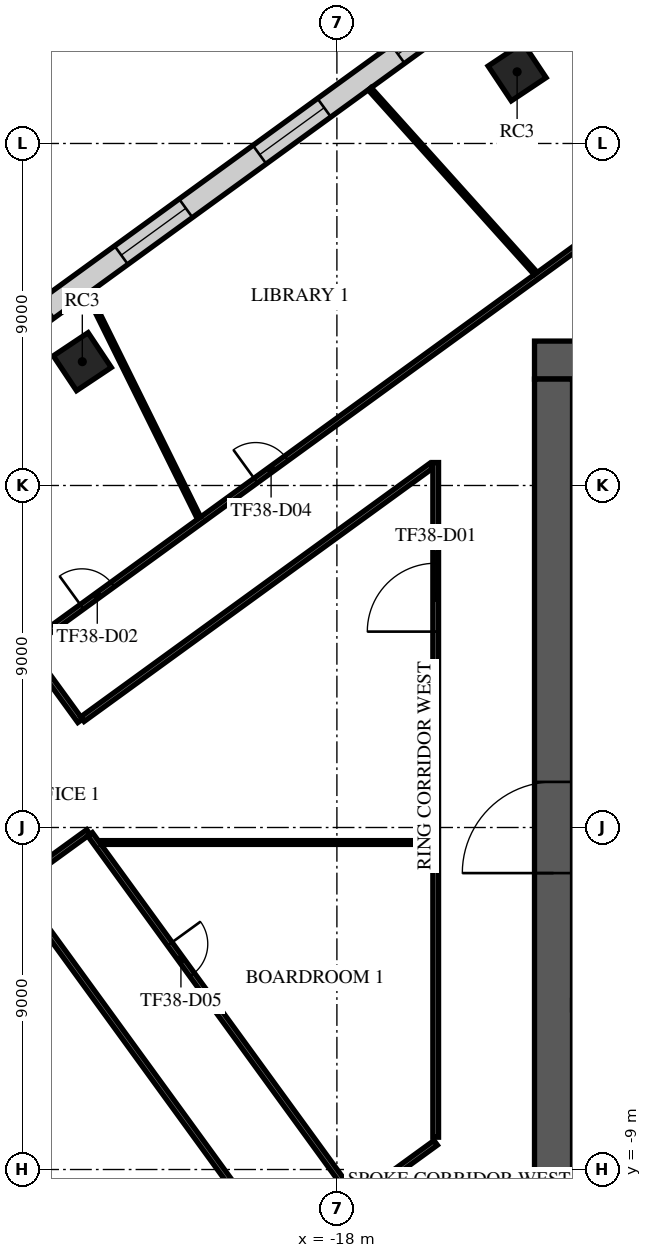
"""IFC4 building model, lengths in metres.
Left out: names, types, materials, properties, quantities, classifications, styles, units other than length and angle.
Written with IfcOpenShell. Run it as: python <this file> out.ifc"""

import sys

from ifc_helpers import new_model, si_unit, direction, frame, frame_2d, origin, origin_2d, place, context, subcontext, project, spatial, rectangle, extrude, element, fill, save


model = new_model("IFC4")
c1 = context("Model", 3, precision=1e-05, world=origin(), true_north=direction((0.0, 1.0)))
c2 = subcontext(c1, "Body", "Model", "MODEL_VIEW")
j1 = project(units=[si_unit("LENGTHUNIT", "METRE"), si_unit("PLANEANGLEUNIT", "RADIAN")], contexts=[c1])
p1 = place(None, origin())
s1 = spatial("IfcSite", under=j1, at=p1, CompositionType="ELEMENT")
p2 = place(p1, origin())
s2 = spatial("IfcBuilding", under=s1, at=p2, CompositionType="ELEMENT")
p3 = place(p2, frame((0.0, 0.0, 163.7)))
s3 = spatial("IfcBuildingStorey", under=s2, at=p3, CompositionType="ELEMENT", Elevation=163.7)
for number, where, z_axis, x_axis in (
    (1, (-13.258, 19.885, 0.0), (0.0, 0.0, 1.0), (0.832, 0.555, 0.0)),
    (2, (-24.699, 12.258, 0.0), (0.0, 0.0, 1.0), (0.832, 0.555, 0.0)),
):
    element("IfcColumn", number, at=place(p3, frame(where, z_axis=z_axis, x_axis=x_axis)), inside=s3, PredefinedType="COLUMN", context=c2, shape_type="SweptSolid", body=[
        extrude(rectangle(XDim=1.1, YDim=1.1, at=origin_2d()), origin(), (0.0, 0.0, 1.0), 4.0),
    ])
p4 = place(p3, frame((-12.8, 12.3, 0.0), z_axis=(0.0, 0.0, 1.0), x_axis=(1.0, 0.0, 0.0)))
e3 = element("IfcWall", 3, at=p4, inside=s3, PredefinedType="SHEAR", context=c2, shape_type="SweptSolid", body=[
    extrude(rectangle(XDim=25.6, YDim=1.0, at=frame_2d((12.8, 0.0))), origin(), (0.0, 0.0, 1.0), 3.6),
])
p5 = place(p4, frame((11.6, 0.0, 0.0)))
e4 = element("IfcOpeningElement", 4, at=p5, cuts=e3, PredefinedType="OPENING", context=c2, shape_type="SweptSolid", body=[
    extrude(rectangle(XDim=2.4, YDim=2.4, at=frame_2d((1.2, 1.2))), frame((0.0, 0.51, 0.0), z_axis=(0.0, -1.0, 0.0), x_axis=(1.0, 0.0, 0.0)), (0.0, 0.0, 1.0), 1.02),
])
p6 = place(p4, frame((22.425, 0.0, 0.0)))
e5 = element("IfcOpeningElement", 5, at=p6, cuts=e3, PredefinedType="OPENING", context=c2, shape_type="SweptSolid", body=[
    extrude(rectangle(XDim=1.2, YDim=2.1, at=frame_2d((0.6, 1.05))), frame((0.0, 0.51, 0.0), z_axis=(0.0, -1.0, 0.0), x_axis=(1.0, 0.0, 0.0)), (0.0, 0.0, 1.0), 1.02),
])
p7 = place(p4, frame((1.4, 0.0, 0.0)))
e6 = element("IfcOpeningElement", 6, at=p7, cuts=e3, PredefinedType="OPENING", context=c2, shape_type="SweptSolid", body=[
    extrude(rectangle(XDim=1.0, YDim=2.1, at=frame_2d((0.5, 1.05))), frame((0.0, 0.51, 0.0), z_axis=(0.0, -1.0, 0.0), x_axis=(1.0, 0.0, 0.0)), (0.0, 0.0, 1.0), 1.02),
])
p8 = place(p3, frame((-12.3, -11.8, 0.0), z_axis=(0.0, 0.0, 1.0), x_axis=(0.0, 1.0, 0.0)))
e7 = element("IfcWall", 7, at=p8, inside=s3, PredefinedType="SHEAR", context=c2, shape_type="SweptSolid", body=[
    extrude(rectangle(XDim=23.6, YDim=1.0, at=frame_2d((11.8, 0.0))), origin(), (0.0, 0.0, 1.0), 3.6),
])
p9 = place(p8, frame((10.6, 0.0, 0.0)))
e8 = element("IfcOpeningElement", 8, at=p9, cuts=e7, PredefinedType="OPENING", context=c2, shape_type="SweptSolid", body=[
    extrude(rectangle(XDim=2.4, YDim=2.4, at=frame_2d((1.2, 1.2))), frame((0.0, 0.51, 0.0), z_axis=(0.0, -1.0, 0.0), x_axis=(1.0, 0.0, 0.0)), (0.0, 0.0, 1.0), 1.02),
])
p10 = place(p3, frame((-8.65, -4.675, 0.0), z_axis=(0.0, 0.0, 1.0), x_axis=(-1.0, 0.0, 0.0)))
e9 = element("IfcWall", 9, at=p10, inside=s3, PredefinedType="SOLIDWALL", context=c2, shape_type="SweptSolid", body=[
    extrude(rectangle(XDim=3.15, YDim=0.25, at=frame_2d((1.575, 0.0))), origin(), (0.0, 0.0, 1.0), 3.6),
])
p11 = place(p3, frame((4.48, 35.516, 0.0), z_axis=(0.0, 0.0, 1.0), x_axis=(-0.809018017995, -0.587783843398, 0.0)))
e10 = element("IfcWall", 10, at=p11, inside=s3, PredefinedType="STANDARD", context=c2, shape_type="SweptSolid", body=[
    extrude(rectangle(XDim=49.376, YDim=0.6, at=frame_2d((24.688, 0.0))), origin(), (0.0, 0.0, 1.0), 3.6),
])
p12 = place(p11, frame((1.2, 0.0, 0.9)))
e11 = element("IfcOpeningElement", 11, at=p12, cuts=e10, PredefinedType="OPENING", context=c2, shape_type="SweptSolid", body=[
    extrude(rectangle(XDim=2.1, YDim=2.1, at=frame_2d((1.05, 1.05))), frame((0.0, 0.31, 0.0), z_axis=(0.0, -1.0, 0.0), x_axis=(1.0, 0.0, 0.0)), (0.0, 0.0, 1.0), 0.62),
])
p13 = place(p11, frame((5.7, 0.0, 0.9)))
e12 = element("IfcOpeningElement", 12, at=p13, cuts=e10, PredefinedType="OPENING", context=c2, shape_type="SweptSolid", body=[
    extrude(rectangle(XDim=2.1, YDim=2.1, at=frame_2d((1.05, 1.05))), frame((0.0, 0.31, 0.0), z_axis=(0.0, -1.0, 0.0), x_axis=(1.0, 0.0, 0.0)), (0.0, 0.0, 1.0), 0.62),
])
p14 = place(p11, frame((10.2, 0.0, 0.9)))
e13 = element("IfcOpeningElement", 13, at=p14, cuts=e10, PredefinedType="OPENING", context=c2, shape_type="SweptSolid", body=[
    extrude(rectangle(XDim=2.1, YDim=2.1, at=frame_2d((1.05, 1.05))), frame((0.0, 0.31, 0.0), z_axis=(0.0, -1.0, 0.0), x_axis=(1.0, 0.0, 0.0)), (0.0, 0.0, 1.0), 0.62),
])
p15 = place(p11, frame((14.7, 0.0, 0.9)))
e14 = element("IfcOpeningElement", 14, at=p15, cuts=e10, PredefinedType="OPENING", context=c2, shape_type="SweptSolid", body=[
    extrude(rectangle(XDim=2.1, YDim=2.1, at=frame_2d((1.05, 1.05))), frame((0.0, 0.31, 0.0), z_axis=(0.0, -1.0, 0.0), x_axis=(1.0, 0.0, 0.0)), (0.0, 0.0, 1.0), 0.62),
])
p16 = place(p11, frame((19.2, 0.0, 0.9)))
e15 = element("IfcOpeningElement", 15, at=p16, cuts=e10, PredefinedType="OPENING", context=c2, shape_type="SweptSolid", body=[
    extrude(rectangle(XDim=2.1, YDim=2.1, at=frame_2d((1.05, 1.05))), frame((0.0, 0.31, 0.0), z_axis=(0.0, -1.0, 0.0), x_axis=(1.0, 0.0, 0.0)), (0.0, 0.0, 1.0), 0.62),
])
p17 = place(p11, frame((23.7, 0.0, 0.9)))
e16 = element("IfcOpeningElement", 16, at=p17, cuts=e10, PredefinedType="OPENING", context=c2, shape_type="SweptSolid", body=[
    extrude(rectangle(XDim=2.1, YDim=2.1, at=frame_2d((1.05, 1.05))), frame((0.0, 0.31, 0.0), z_axis=(0.0, -1.0, 0.0), x_axis=(1.0, 0.0, 0.0)), (0.0, 0.0, 1.0), 0.62),
])
p18 = place(p11, frame((28.2, 0.0, 0.9)))
e17 = element("IfcOpeningElement", 17, at=p18, cuts=e10, PredefinedType="OPENING", context=c2, shape_type="SweptSolid", body=[
    extrude(rectangle(XDim=2.1, YDim=2.1, at=frame_2d((1.05, 1.05))), frame((0.0, 0.31, 0.0), z_axis=(0.0, -1.0, 0.0), x_axis=(1.0, 0.0, 0.0)), (0.0, 0.0, 1.0), 0.62),
])
p19 = place(p11, frame((32.7, 0.0, 0.9)))
e18 = element("IfcOpeningElement", 18, at=p19, cuts=e10, PredefinedType="OPENING", context=c2, shape_type="SweptSolid", body=[
    extrude(rectangle(XDim=2.1, YDim=2.1, at=frame_2d((1.05, 1.05))), frame((0.0, 0.31, 0.0), z_axis=(0.0, -1.0, 0.0), x_axis=(1.0, 0.0, 0.0)), (0.0, 0.0, 1.0), 0.62),
])
p20 = place(p11, frame((37.2, 0.0, 0.9)))
e19 = element("IfcOpeningElement", 19, at=p20, cuts=e10, PredefinedType="OPENING", context=c2, shape_type="SweptSolid", body=[
    extrude(rectangle(XDim=2.1, YDim=2.1, at=frame_2d((1.05, 1.05))), frame((0.0, 0.31, 0.0), z_axis=(0.0, -1.0, 0.0), x_axis=(1.0, 0.0, 0.0)), (0.0, 0.0, 1.0), 0.62),
])
p21 = place(p11, frame((41.7, 0.0, 0.9)))
e20 = element("IfcOpeningElement", 20, at=p21, cuts=e10, PredefinedType="OPENING", context=c2, shape_type="SweptSolid", body=[
    extrude(rectangle(XDim=2.1, YDim=2.1, at=frame_2d((1.05, 1.05))), frame((0.0, 0.31, 0.0), z_axis=(0.0, -1.0, 0.0), x_axis=(1.0, 0.0, 0.0)), (0.0, 0.0, 1.0), 0.62),
])
p22 = place(p11, frame((46.138, 0.0, 0.9)))
e21 = element("IfcOpeningElement", 21, at=p22, cuts=e10, PredefinedType="OPENING", context=c2, shape_type="SweptSolid", body=[
    extrude(rectangle(XDim=2.1, YDim=2.1, at=frame_2d((1.05, 1.05))), frame((0.0, 0.31, 0.0), z_axis=(0.0, -1.0, 0.0), x_axis=(1.0, 0.0, 0.0)), (0.0, 0.0, 1.0), 0.62),
])
p23 = place(p3, frame((-36.533, -0.245, 0.0), z_axis=(0.0, 0.0, 1.0), x_axis=(0.587787495615, -0.809015364501, 0.0)))
e22 = element("IfcWall", 22, at=p23, inside=s3, PredefinedType="STANDARD", context=c2, shape_type="SweptSolid", body=[
    extrude(rectangle(XDim=42.552, YDim=0.6, at=frame_2d((21.276, 0.0))), origin(), (0.0, 0.0, 1.0), 3.6),
])
p24 = place(p23, frame((1.178, 0.0, 0.9)))
e23 = element("IfcOpeningElement", 23, at=p24, cuts=e22, PredefinedType="OPENING", context=c2, shape_type="SweptSolid", body=[
    extrude(rectangle(XDim=1.8, YDim=2.1, at=frame_2d((0.9, 1.05))), frame((0.0, 0.31, 0.0), z_axis=(0.0, -1.0, 0.0), x_axis=(1.0, 0.0, 0.0)), (0.0, 0.0, 1.0), 0.62),
])
p25 = place(p23, frame((5.396, 0.0, 0.9)))
e24 = element("IfcOpeningElement", 24, at=p25, cuts=e22, PredefinedType="OPENING", context=c2, shape_type="SweptSolid", body=[
    extrude(rectangle(XDim=1.8, YDim=2.1, at=frame_2d((0.9, 1.05))), frame((0.0, 0.31, 0.0), z_axis=(0.0, -1.0, 0.0), x_axis=(1.0, 0.0, 0.0)), (0.0, 0.0, 1.0), 0.62),
])
p26 = place(p23, frame((9.676, 0.0, 0.9)))
e25 = element("IfcOpeningElement", 25, at=p26, cuts=e22, PredefinedType="OPENING", context=c2, shape_type="SweptSolid", body=[
    extrude(rectangle(XDim=1.8, YDim=2.1, at=frame_2d((0.9, 1.05))), frame((0.0, 0.31, 0.0), z_axis=(0.0, -1.0, 0.0), x_axis=(1.0, 0.0, 0.0)), (0.0, 0.0, 1.0), 0.62),
])
p27 = place(p23, frame((13.956, 0.0, 0.9)))
e26 = element("IfcOpeningElement", 26, at=p27, cuts=e22, PredefinedType="OPENING", context=c2, shape_type="SweptSolid", body=[
    extrude(rectangle(XDim=1.8, YDim=2.1, at=frame_2d((0.9, 1.05))), frame((0.0, 0.31, 0.0), z_axis=(0.0, -1.0, 0.0), x_axis=(1.0, 0.0, 0.0)), (0.0, 0.0, 1.0), 0.62),
])
p28 = place(p23, frame((18.236, 0.0, 0.9)))
e27 = element("IfcOpeningElement", 27, at=p28, cuts=e22, PredefinedType="OPENING", context=c2, shape_type="SweptSolid", body=[
    extrude(rectangle(XDim=1.8, YDim=2.1, at=frame_2d((0.9, 1.05))), frame((0.0, 0.31, 0.0), z_axis=(0.0, -1.0, 0.0), x_axis=(1.0, 0.0, 0.0)), (0.0, 0.0, 1.0), 0.62),
])
p29 = place(p23, frame((22.516, 0.0, 0.9)))
e28 = element("IfcOpeningElement", 28, at=p29, cuts=e22, PredefinedType="OPENING", context=c2, shape_type="SweptSolid", body=[
    extrude(rectangle(XDim=1.8, YDim=2.1, at=frame_2d((0.9, 1.05))), frame((0.0, 0.31, 0.0), z_axis=(0.0, -1.0, 0.0), x_axis=(1.0, 0.0, 0.0)), (0.0, 0.0, 1.0), 0.62),
])
p30 = place(p23, frame((26.796, 0.0, 0.9)))
e29 = element("IfcOpeningElement", 29, at=p30, cuts=e22, PredefinedType="OPENING", context=c2, shape_type="SweptSolid", body=[
    extrude(rectangle(XDim=1.8, YDim=2.1, at=frame_2d((0.9, 1.05))), frame((0.0, 0.31, 0.0), z_axis=(0.0, -1.0, 0.0), x_axis=(1.0, 0.0, 0.0)), (0.0, 0.0, 1.0), 0.62),
])
p31 = place(p23, frame((31.076, 0.0, 0.9)))
e30 = element("IfcOpeningElement", 30, at=p31, cuts=e22, PredefinedType="OPENING", context=c2, shape_type="SweptSolid", body=[
    extrude(rectangle(XDim=1.8, YDim=2.1, at=frame_2d((0.9, 1.05))), frame((0.0, 0.31, 0.0), z_axis=(0.0, -1.0, 0.0), x_axis=(1.0, 0.0, 0.0)), (0.0, 0.0, 1.0), 0.62),
])
p32 = place(p23, frame((35.356, 0.0, 0.9)))
e31 = element("IfcOpeningElement", 31, at=p32, cuts=e22, PredefinedType="OPENING", context=c2, shape_type="SweptSolid", body=[
    extrude(rectangle(XDim=1.8, YDim=2.1, at=frame_2d((0.9, 1.05))), frame((0.0, 0.31, 0.0), z_axis=(0.0, -1.0, 0.0), x_axis=(1.0, 0.0, 0.0)), (0.0, 0.0, 1.0), 0.62),
])
p33 = place(p23, frame((39.573, 0.0, 0.9)))
e32 = element("IfcOpeningElement", 32, at=p33, cuts=e22, PredefinedType="OPENING", context=c2, shape_type="SweptSolid", body=[
    extrude(rectangle(XDim=1.8, YDim=2.1, at=frame_2d((0.9, 1.05))), frame((0.0, 0.31, 0.0), z_axis=(0.0, -1.0, 0.0), x_axis=(1.0, 0.0, 0.0)), (0.0, 0.0, 1.0), 0.62),
])
p34 = place(p3, frame((-26.481, -1.528, 0.0), z_axis=(0.0, 0.0, 1.0), x_axis=(0.809158191643, 0.587590861822, 0.0)))
e33 = element("IfcWall", 33, at=p34, inside=s3, PredefinedType="PARTITIONING", context=c2, shape_type="SweptSolid", body=[
    extrude(rectangle(XDim=2.4, YDim=0.15, at=frame_2d((1.2, 0.0))), origin(), (0.0, 0.0, 1.0), 3.15),
])
p35 = place(p3, frame((-26.437, -1.589, 0.0), z_axis=(0.0, 0.0, 1.0), x_axis=(0.587768879666, -0.809028889531, 0.0)))
e34 = element("IfcWall", 34, at=p35, inside=s3, PredefinedType="PARTITIONING", context=c2, shape_type="SweptSolid", body=[
    extrude(rectangle(XDim=28.583, YDim=0.15, at=frame_2d((14.292, 0.0))), origin(), (0.0, 0.0, 1.0), 3.15),
])
p36 = place(p35, frame((16.711, 0.0, 0.0)))
e35 = element("IfcOpeningElement", 35, at=p36, cuts=e34, PredefinedType="OPENING", context=c2, shape_type="SweptSolid", body=[
    extrude(rectangle(XDim=1.0, YDim=2.1, at=frame_2d((0.5, 1.05))), frame((0.0, 0.085, 0.0), z_axis=(0.0, -1.0, 0.0), x_axis=(1.0, 0.0, 0.0)), (0.0, 0.0, 1.0), 0.17),
])
p37 = place(p3, frame((-26.166, 4.749, 0.0), z_axis=(0.0, 0.0, 1.0), x_axis=(0.809023795939, 0.587775890628, 0.0)))
e36 = element("IfcWall", 36, at=p37, inside=s3, PredefinedType="PARTITIONING", context=c2, shape_type="SweptSolid", body=[
    extrude(rectangle(XDim=36.756, YDim=0.15, at=frame_2d((18.378, 0.0))), origin(), (0.0, 0.0, 1.0), 3.15),
])
p38 = place(p37, frame((1.8, 0.0, 0.0)))
e37 = element("IfcOpeningElement", 37, at=p38, cuts=e36, PredefinedType="OPENING", context=c2, shape_type="SweptSolid", body=[
    extrude(rectangle(XDim=1.0, YDim=2.1, at=frame_2d((0.5, 1.05))), frame((0.0, 0.085, 0.0), z_axis=(0.0, -1.0, 0.0), x_axis=(1.0, 0.0, 0.0)), (0.0, 0.0, 1.0), 0.17),
])
p39 = place(p37, frame((7.453, 0.0, 0.0)))
e38 = element("IfcOpeningElement", 38, at=p39, cuts=e36, PredefinedType="OPENING", context=c2, shape_type="SweptSolid", body=[
    extrude(rectangle(XDim=1.0, YDim=2.1, at=frame_2d((0.5, 1.05))), frame((0.0, 0.085, 0.0), z_axis=(0.0, -1.0, 0.0), x_axis=(1.0, 0.0, 0.0)), (0.0, 0.0, 1.0), 0.17),
])
p40 = place(p37, frame((20.671, 0.0, 0.0)))
e39 = element("IfcOpeningElement", 39, at=p40, cuts=e36, PredefinedType="OPENING", context=c2, shape_type="SweptSolid", body=[
    extrude(rectangle(XDim=1.0, YDim=2.1, at=frame_2d((0.5, 1.05))), frame((0.0, 0.085, 0.0), z_axis=(0.0, -1.0, 0.0), x_axis=(1.0, 0.0, 0.0)), (0.0, 0.0, 1.0), 0.17),
])
p41 = place(p37, frame((27.382, 0.0, 0.0)))
e40 = element("IfcOpeningElement", 40, at=p41, cuts=e36, PredefinedType="OPENING", context=c2, shape_type="SweptSolid", body=[
    extrude(rectangle(XDim=1.8, YDim=2.1, at=frame_2d((0.9, 1.05))), frame((0.0, 0.085, 0.0), z_axis=(0.0, -1.0, 0.0), x_axis=(1.0, 0.0, 0.0)), (0.0, 0.0, 1.0), 0.17),
])
p42 = place(p3, frame((-26.122, 4.688, 0.0), z_axis=(0.0, 0.0, 1.0), x_axis=(0.5874596315, -0.809253471638, 0.0)))
e41 = element("IfcWall", 41, at=p42, inside=s3, PredefinedType="PARTITIONING", context=c2, shape_type="SweptSolid", body=[
    extrude(rectangle(XDim=2.325, YDim=0.15, at=frame_2d((1.162, 0.0))), origin(), (0.0, 0.0, 1.0), 3.15),
])
p43 = place(p3, frame((-24.695, 2.851, 0.0), z_axis=(0.0, 0.0, 1.0), x_axis=(0.809035699289, 0.587759506326, 0.0)))
e42 = element("IfcWall", 42, at=p43, inside=s3, PredefinedType="PARTITIONING", context=c2, shape_type="SweptSolid", body=[
    extrude(rectangle(XDim=11.342, YDim=0.15, at=frame_2d((5.671, 0.0))), origin(), (0.0, 0.0, 1.0), 3.15),
])
p44 = place(p3, frame((-24.495, -0.179, 0.0), z_axis=(0.0, 0.0, 1.0), x_axis=(0.587806096184, -0.809001849991, 0.0)))
e43 = element("IfcWall", 43, at=p44, inside=s3, PredefinedType="PARTITIONING", context=c2, shape_type="SweptSolid", body=[
    extrude(rectangle(XDim=11.914, YDim=0.15, at=frame_2d((5.957, 0.0))), origin(), (0.0, 0.0, 1.0), 3.15),
])
p45 = place(p44, frame((3.568, 0.0, 0.0)))
e44 = element("IfcOpeningElement", 44, at=p45, cuts=e43, PredefinedType="OPENING", context=c2, shape_type="SweptSolid", body=[
    extrude(rectangle(XDim=1.0, YDim=2.1, at=frame_2d((0.5, 1.05))), frame((0.0, 0.085, 0.0), z_axis=(0.0, -1.0, 0.0), x_axis=(1.0, 0.0, 0.0)), (0.0, 0.0, 1.0), 0.17),
])
p46 = place(p3, frame((-17.431, -9.773, 0.0), z_axis=(0.0, 0.0, 1.0), x_axis=(0.809042902641, 0.587749590971, 0.0)))
e45 = element("IfcWall", 45, at=p46, inside=s3, PredefinedType="PARTITIONING", context=c2, shape_type="SweptSolid", body=[
    extrude(rectangle(XDim=2.511, YDim=0.15, at=frame_2d((1.255, 0.0))), origin(), (0.0, 0.0, 1.0), 3.15),
])
p47 = place(p3, frame((-15.4, -8.15, 0.0), z_axis=(0.0, 0.0, 1.0), x_axis=(0.0, 1.0, 0.0)))
e46 = element("IfcWall", 46, at=p47, inside=s3, PredefinedType="PARTITIONING", context=c2, shape_type="SweptSolid", body=[
    extrude(rectangle(XDim=17.754, YDim=0.15, at=frame_2d((8.877, 0.0))), origin(), (0.0, 0.0, 1.0), 3.15),
])
p48 = place(p47, frame((13.304, 0.0, 0.0)))
e47 = element("IfcOpeningElement", 47, at=p48, cuts=e46, PredefinedType="OPENING", context=c2, shape_type="SweptSolid", body=[
    extrude(rectangle(XDim=1.8, YDim=2.1, at=frame_2d((0.9, 1.05))), frame((0.0, 0.085, 0.0), z_axis=(0.0, -1.0, 0.0), x_axis=(1.0, 0.0, 0.0)), (0.0, 0.0, 1.0), 0.17),
])
p49 = place(p3, frame((-24.549, 14.052, 0.0), z_axis=(0.0, 0.0, 1.0), x_axis=(0.443265486379, -0.896390377339, 0.0)))
e48 = element("IfcWall", 48, at=p49, inside=s3, PredefinedType="PARTITIONING", context=c2, shape_type="SweptSolid", body=[
    extrude(rectangle(XDim=6.587, YDim=0.1, at=frame_2d((3.293, 0.0))), origin(), (0.0, 0.0, 1.0), 2.9),
])
p50 = place(p3, frame((-24.209, -0.395, 0.0), z_axis=(0.0, 0.0, 1.0), x_axis=(1.0, 0.0, 0.0)))
e49 = element("IfcWall", 49, at=p50, inside=s3, PredefinedType="PARTITIONING", context=c2, shape_type="SweptSolid", body=[
    extrude(rectangle(XDim=8.734, YDim=0.1, at=frame_2d((4.367, 0.0))), origin(), (0.0, 0.0, 1.0), 3.15),
])
p51 = place(p3, frame((-17.136, 19.438, 0.0), z_axis=(0.0, 0.0, 1.0), x_axis=(0.66853916977, -0.743676931526, 0.0)))
e50 = element("IfcWall", 50, at=p51, inside=s3, PredefinedType="PARTITIONING", context=c2, shape_type="SweptSolid", body=[
    extrude(rectangle(XDim=6.531, YDim=0.1, at=frame_2d((3.266, 0.0))), origin(), (0.0, 0.0, 1.0), 2.9),
])
p52 = place(p9, origin())
e51 = element("IfcDoor", 51, at=p52, inside=s3, OperationType="SINGLE_SWING_LEFT", PredefinedType="DOOR", context=c2, shape_type="SweptSolid", body=[
    extrude(rectangle(XDim=2.4, YDim=2.4, at=frame_2d((1.2, 1.2))), frame((0.0, 0.025, 0.0), z_axis=(0.0, -1.0, 0.0), x_axis=(1.0, 0.0, 0.0)), (0.0, 0.0, 1.0), 0.05),
])
fill(e8, e51)
p53 = place(p17, origin())
e52 = element("IfcWindow", 52, at=p53, inside=s3, PartitioningType="SINGLE_PANEL", PredefinedType="WINDOW", context=c2, shape_type="SweptSolid", body=[
    extrude(rectangle(XDim=2.1, YDim=2.1, at=frame_2d((1.05, 1.05))), frame((0.0, 0.03, 0.0), z_axis=(0.0, -1.0, 0.0), x_axis=(1.0, 0.0, 0.0)), (0.0, 0.0, 1.0), 0.06),
])
fill(e16, e52)
p54 = place(p18, origin())
e53 = element("IfcWindow", 53, at=p54, inside=s3, PartitioningType="SINGLE_PANEL", PredefinedType="WINDOW", context=c2, shape_type="SweptSolid", body=[
    extrude(rectangle(XDim=2.1, YDim=2.1, at=frame_2d((1.05, 1.05))), frame((0.0, 0.03, 0.0), z_axis=(0.0, -1.0, 0.0), x_axis=(1.0, 0.0, 0.0)), (0.0, 0.0, 1.0), 0.06),
])
fill(e17, e53)
p55 = place(p19, origin())
e54 = element("IfcWindow", 54, at=p55, inside=s3, PartitioningType="SINGLE_PANEL", PredefinedType="WINDOW", context=c2, shape_type="SweptSolid", body=[
    extrude(rectangle(XDim=2.1, YDim=2.1, at=frame_2d((1.05, 1.05))), frame((0.0, 0.03, 0.0), z_axis=(0.0, -1.0, 0.0), x_axis=(1.0, 0.0, 0.0)), (0.0, 0.0, 1.0), 0.06),
])
fill(e18, e54)
p56 = place(p48, origin())
e55 = element("IfcDoor", 55, at=p56, inside=s3, OperationType="DOUBLE_DOOR_SINGLE_SWING", PredefinedType="DOOR", context=c2, shape_type="SweptSolid", body=[
    extrude(rectangle(XDim=1.8, YDim=2.1, at=frame_2d((0.9, 1.05))), frame((0.0, 0.025, 0.0), z_axis=(0.0, -1.0, 0.0), x_axis=(1.0, 0.0, 0.0)), (0.0, 0.0, 1.0), 0.05),
])
fill(e47, e55)
p57 = place(p38, origin())
e56 = element("IfcDoor", 56, at=p57, inside=s3, OperationType="SINGLE_SWING_RIGHT", PredefinedType="DOOR", context=c2, shape_type="SweptSolid", body=[
    extrude(rectangle(XDim=1.0, YDim=2.1, at=frame_2d((0.5, 1.05))), frame((0.0, 0.025, 0.0), z_axis=(0.0, -1.0, 0.0), x_axis=(1.0, 0.0, 0.0)), (0.0, 0.0, 1.0), 0.05),
])
fill(e37, e56)
p58 = place(p39, origin())
e57 = element("IfcDoor", 57, at=p58, inside=s3, OperationType="SINGLE_SWING_LEFT", PredefinedType="DOOR", context=c2, shape_type="SweptSolid", body=[
    extrude(rectangle(XDim=1.0, YDim=2.1, at=frame_2d((0.5, 1.05))), frame((0.0, 0.025, 0.0), z_axis=(0.0, -1.0, 0.0), x_axis=(1.0, 0.0, 0.0)), (0.0, 0.0, 1.0), 0.05),
])
fill(e38, e57)
p59 = place(p45, origin())
e58 = element("IfcDoor", 58, at=p59, inside=s3, OperationType="SINGLE_SWING_RIGHT", PredefinedType="DOOR", context=c2, shape_type="SweptSolid", body=[
    extrude(rectangle(XDim=1.0, YDim=2.1, at=frame_2d((0.5, 1.05))), frame((0.0, 0.025, 0.0), z_axis=(0.0, -1.0, 0.0), x_axis=(1.0, 0.0, 0.0)), (0.0, 0.0, 1.0), 0.05),
])
fill(e44, e58)
save(model, sys.argv[1])
